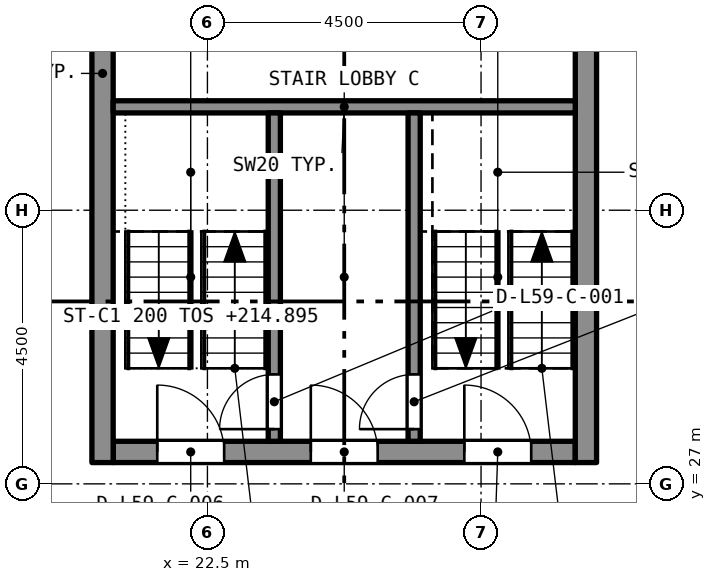
"""IFC4 building model, lengths in metres.
Left out: names, types, materials, properties, quantities, classifications, styles, units other than length and angle.
Written with IfcOpenShell. Run it as: python <this file> out.ifc"""

import sys

from ifc_helpers import new_model, si_unit, direction, frame, frame_2d, origin, place, context, subcontext, project, spatial, rectangle, extrude, element, fill, save


model = new_model("IFC4")
c1 = context("Model", 3, precision=1e-05, world=origin(), true_north=direction((0.0, 1.0)))
c2 = subcontext(c1, "Body", "Model", "MODEL_VIEW")
j1 = project(units=[si_unit("LENGTHUNIT", "METRE"), si_unit("PLANEANGLEUNIT", "RADIAN")], contexts=[c1])
p1 = place(None, origin())
s1 = spatial("IfcSite", under=j1, at=p1, CompositionType="ELEMENT")
p2 = place(p1, origin())
s2 = spatial("IfcBuilding", under=s1, at=p2, CompositionType="ELEMENT")
p3 = place(p2, frame((0.0, 0.0, 213.295)))
s3 = spatial("IfcBuildingStorey", under=s2, at=p3, CompositionType="ELEMENT", Elevation=213.295)
p4 = place(p3, frame((20.95, 27.525, 0.0), z_axis=(0.0, 0.0, 1.0), x_axis=(1.0, 0.0, 0.0)))
e1 = element("IfcWall", 1, at=p4, inside=s3, PredefinedType="SOLIDWALL", context=c2, shape_type="SweptSolid", body=[
    extrude(rectangle(XDim=7.6, YDim=0.35, at=frame_2d((3.8, 0.0))), origin(), (0.0, 0.0, 1.0), 3.2),
])
p5 = place(p4, frame((0.725, 0.0, 0.0)))
e2 = element("IfcOpeningElement", 2, at=p5, cuts=e1, PredefinedType="OPENING", context=c2, shape_type="SweptSolid", body=[
    extrude(rectangle(XDim=1.1, YDim=2.1, at=frame_2d((0.55, 1.05))), frame((0.0, 0.185, 0.0), z_axis=(0.0, -1.0, 0.0), x_axis=(1.0, 0.0, 0.0)), (0.0, 0.0, 1.0), 0.37),
])
p6 = place(p4, frame((3.25, 0.0, 0.0)))
e3 = element("IfcOpeningElement", 3, at=p6, cuts=e1, PredefinedType="OPENING", context=c2, shape_type="SweptSolid", body=[
    extrude(rectangle(XDim=1.1, YDim=2.1, at=frame_2d((0.55, 1.05))), frame((0.0, 0.185, 0.0), z_axis=(0.0, -1.0, 0.0), x_axis=(1.0, 0.0, 0.0)), (0.0, 0.0, 1.0), 0.37),
])
p7 = place(p4, frame((5.775, 0.0, 0.0)))
e4 = element("IfcOpeningElement", 4, at=p7, cuts=e1, PredefinedType="OPENING", context=c2, shape_type="SweptSolid", body=[
    extrude(rectangle(XDim=1.1, YDim=2.1, at=frame_2d((0.55, 1.05))), frame((0.0, 0.185, 0.0), z_axis=(0.0, -1.0, 0.0), x_axis=(1.0, 0.0, 0.0)), (0.0, 0.0, 1.0), 0.37),
])
p8 = place(p3, frame((20.775, 27.35, 0.0), z_axis=(0.0, 0.0, 1.0), x_axis=(0.0, 1.0, 0.0)))
e5 = element("IfcWall", 5, at=p8, inside=s3, PredefinedType="SOLIDWALL", context=c2, shape_type="SweptSolid", body=[
    extrude(rectangle(XDim=12.8, YDim=0.35, at=frame_2d((6.4, 0.0))), origin(), (0.0, 0.0, 1.0), 3.2),
])
p9 = place(p8, frame((8.6, 0.0, 0.0)))
e6 = element("IfcOpeningElement", 6, at=p9, cuts=e5, PredefinedType="OPENING", context=c2, shape_type="SweptSolid", body=[
    extrude(rectangle(XDim=1.2, YDim=2.1, at=frame_2d((0.6, 1.05))), frame((0.0, 0.185, 0.0), z_axis=(0.0, -1.0, 0.0), x_axis=(1.0, 0.0, 0.0)), (0.0, 0.0, 1.0), 0.37),
])
p10 = place(p3, frame((28.725, 27.35, 0.0), z_axis=(0.0, 0.0, 1.0), x_axis=(0.0, 1.0, 0.0)))
e7 = element("IfcWall", 7, at=p10, inside=s3, PredefinedType="SOLIDWALL", context=c2, shape_type="SweptSolid", body=[
    extrude(rectangle(XDim=12.8, YDim=0.35, at=frame_2d((6.4, 0.0))), origin(), (0.0, 0.0, 1.0), 3.2),
])
p11 = place(p10, frame((8.6, 0.0, 0.0)))
e8 = element("IfcOpeningElement", 8, at=p11, cuts=e7, PredefinedType="OPENING", context=c2, shape_type="SweptSolid", body=[
    extrude(rectangle(XDim=1.2, YDim=2.1, at=frame_2d((0.6, 1.05))), frame((0.0, 0.185, 0.0), z_axis=(0.0, -1.0, 0.0), x_axis=(1.0, 0.0, 0.0)), (0.0, 0.0, 1.0), 0.37),
])
p12 = place(p3, frame((20.95, 33.2, 0.0), z_axis=(0.0, 0.0, 1.0), x_axis=(1.0, 0.0, 0.0)))
e9 = element("IfcWall", 9, at=p12, inside=s3, PredefinedType="SOLIDWALL", context=c2, shape_type="SweptSolid", body=[
    extrude(rectangle(XDim=7.6, YDim=0.2, at=frame_2d((3.8, 0.0))), origin(), (0.0, 0.0, 1.0), 2.9),
])
p13 = place(p3, frame((23.6, 27.7, 0.0), z_axis=(0.0, 0.0, 1.0), x_axis=(0.0, 1.0, 0.0)))
e10 = element("IfcWall", 10, at=p13, inside=s3, PredefinedType="SOLIDWALL", context=c2, shape_type="SweptSolid", body=[
    extrude(rectangle(XDim=5.4, YDim=0.2, at=frame_2d((2.7, 0.0))), origin(), (0.0, 0.0, 1.0), 2.9),
])
p14 = place(p13, frame((0.2, 0.0, 0.0)))
e11 = element("IfcOpeningElement", 11, at=p14, cuts=e10, PredefinedType="OPENING", context=c2, shape_type="SweptSolid", body=[
    extrude(rectangle(XDim=0.9, YDim=2.1, at=frame_2d((0.45, 1.05))), frame((0.0, 0.11, 0.0), z_axis=(0.0, -1.0, 0.0), x_axis=(1.0, 0.0, 0.0)), (0.0, 0.0, 1.0), 0.22),
])
p15 = place(p3, frame((25.9, 27.7, 0.0), z_axis=(0.0, 0.0, 1.0), x_axis=(0.0, 1.0, 0.0)))
e12 = element("IfcWall", 12, at=p15, inside=s3, PredefinedType="SOLIDWALL", context=c2, shape_type="SweptSolid", body=[
    extrude(rectangle(XDim=5.4, YDim=0.2, at=frame_2d((2.7, 0.0))), origin(), (0.0, 0.0, 1.0), 2.9),
])
p16 = place(p15, frame((0.2, 0.0, 0.0)))
e13 = element("IfcOpeningElement", 13, at=p16, cuts=e12, PredefinedType="OPENING", context=c2, shape_type="SweptSolid", body=[
    extrude(rectangle(XDim=0.9, YDim=2.1, at=frame_2d((0.45, 1.05))), frame((0.0, 0.11, 0.0), z_axis=(0.0, -1.0, 0.0), x_axis=(1.0, 0.0, 0.0)), (0.0, 0.0, 1.0), 0.22),
])
p17 = place(p14, origin())
e14 = element("IfcDoor", 14, at=p17, inside=s3, OperationType="SINGLE_SWING_LEFT", PredefinedType="DOOR", context=c2, shape_type="SweptSolid", body=[
    extrude(rectangle(XDim=0.9, YDim=2.1, at=frame_2d((0.45, 1.05))), frame((0.0, 0.025, 0.0), z_axis=(0.0, -1.0, 0.0), x_axis=(1.0, 0.0, 0.0)), (0.0, 0.0, 1.0), 0.05),
])
fill(e11, e14)
p18 = place(p16, origin())
e15 = element("IfcDoor", 15, at=p18, inside=s3, OperationType="SINGLE_SWING_LEFT", PredefinedType="DOOR", context=c2, shape_type="SweptSolid", body=[
    extrude(rectangle(XDim=0.9, YDim=2.1, at=frame_2d((0.45, 1.05))), frame((0.0, 0.025, 0.0), z_axis=(0.0, -1.0, 0.0), x_axis=(1.0, 0.0, 0.0)), (0.0, 0.0, 1.0), 0.05),
])
fill(e13, e15)
p19 = place(p5, origin())
e16 = element("IfcDoor", 16, at=p19, inside=s3, OperationType="SINGLE_SWING_LEFT", PredefinedType="DOOR", context=c2, shape_type="SweptSolid", body=[
    extrude(rectangle(XDim=1.1, YDim=2.1, at=frame_2d((0.55, 1.05))), frame((0.0, 0.025, 0.0), z_axis=(0.0, -1.0, 0.0), x_axis=(1.0, 0.0, 0.0)), (0.0, 0.0, 1.0), 0.05),
])
fill(e2, e16)
p20 = place(p6, origin())
e17 = element("IfcDoor", 17, at=p20, inside=s3, OperationType="SINGLE_SWING_LEFT", PredefinedType="DOOR", context=c2, shape_type="SweptSolid", body=[
    extrude(rectangle(XDim=1.1, YDim=2.1, at=frame_2d((0.55, 1.05))), frame((0.0, 0.025, 0.0), z_axis=(0.0, -1.0, 0.0), x_axis=(1.0, 0.0, 0.0)), (0.0, 0.0, 1.0), 0.05),
])
fill(e3, e17)
p21 = place(p7, origin())
e18 = element("IfcDoor", 18, at=p21, inside=s3, OperationType="SINGLE_SWING_LEFT", PredefinedType="DOOR", context=c2, shape_type="SweptSolid", body=[
    extrude(rectangle(XDim=1.1, YDim=2.1, at=frame_2d((0.55, 1.05))), frame((0.0, 0.025, 0.0), z_axis=(0.0, -1.0, 0.0), x_axis=(1.0, 0.0, 0.0)), (0.0, 0.0, 1.0), 0.05),
])
fill(e4, e18)
save(model, sys.argv[1])
